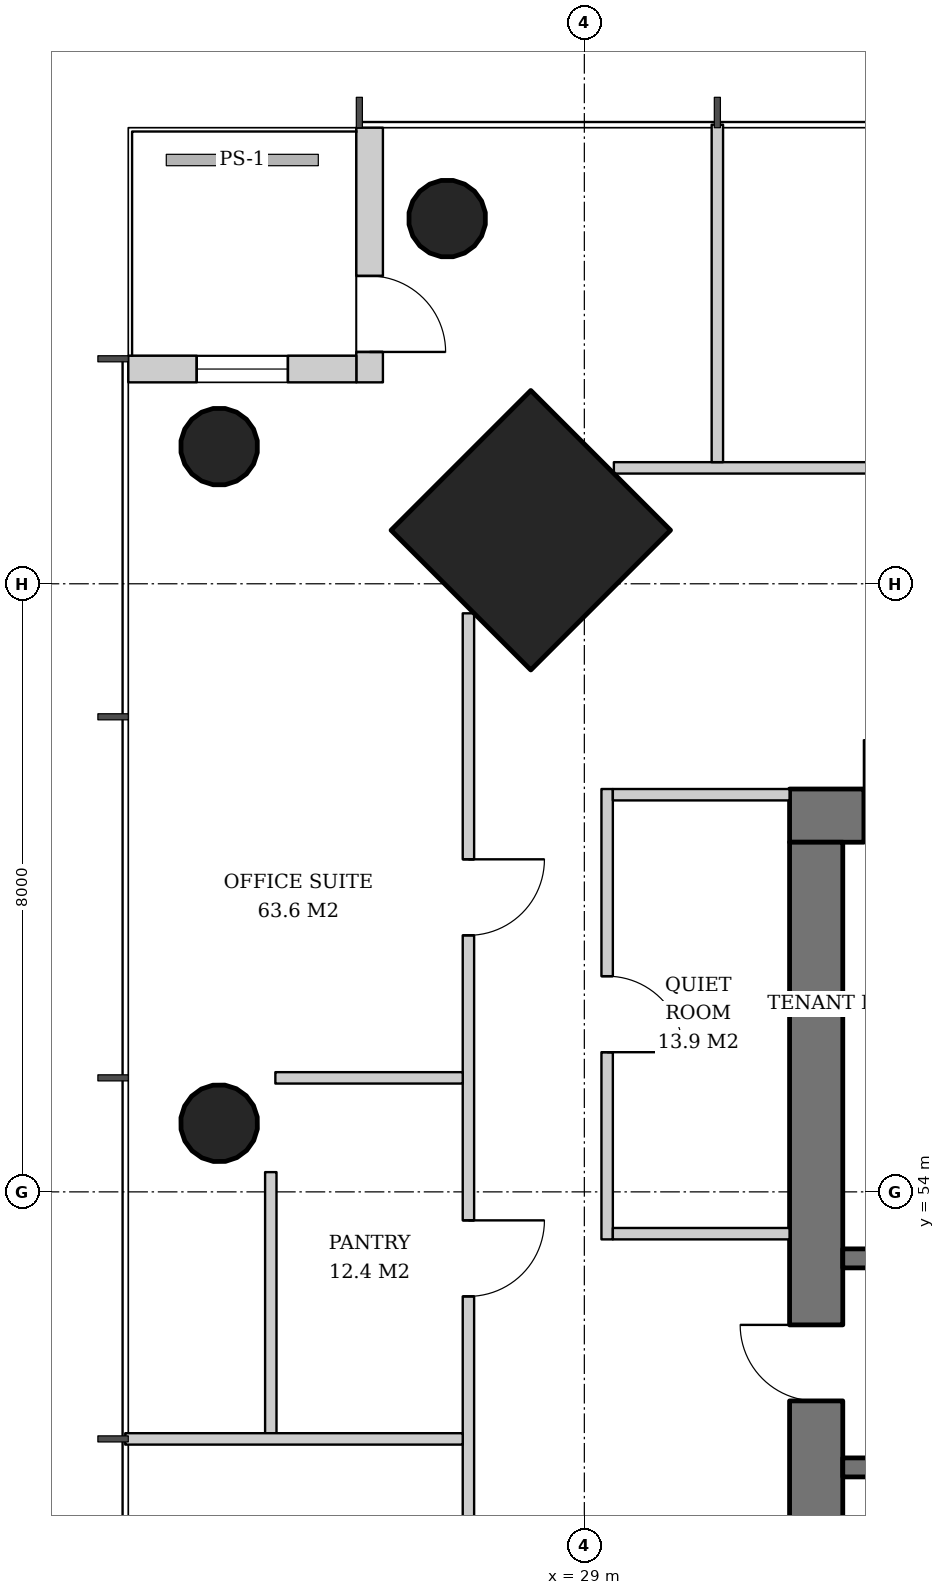
"""IFC4 building model, lengths in metres.
Left out: names, types, materials, properties, quantities, classifications, styles, units other than length and angle.
Written with IfcOpenShell. Run it as: python <this file> out.ifc"""

import sys

from ifc_helpers import new_model, si_unit, direction, frame, frame_2d, origin, origin_2d, place, context, subcontext, project, spatial, rectangle, hollow_circle, extrude, element, fill, save


model = new_model("IFC4")
c1 = context("Model", 3, precision=1e-05, world=origin(), true_north=direction((0.0, 1.0)))
c2 = subcontext(c1, "Body", "Model", "MODEL_VIEW")
j1 = project(units=[si_unit("LENGTHUNIT", "METRE"), si_unit("PLANEANGLEUNIT", "RADIAN")], contexts=[c1])
p1 = place(None, origin())
s1 = spatial("IfcSite", under=j1, at=p1, CompositionType="ELEMENT")
p2 = place(p1, origin())
s2 = spatial("IfcBuilding", under=s1, at=p2, CompositionType="ELEMENT")
p3 = place(p2, frame((0.0, 0.0, 119.8)))
s3 = spatial("IfcBuildingStorey", under=s2, at=p3, CompositionType="ELEMENT", Elevation=119.8)
p4 = place(p3, frame((28.257, 62.743, 0.0), z_axis=(0.031962158256, -0.031962158256, 0.998977898093), x_axis=(0.707106781187, 0.707106781187, 0.0)))
e1 = element("IfcColumn", 1, at=p4, inside=s3, PredefinedType="COLUMN", context=c2, shape_type="SweptSolid", body=[
    extrude(rectangle(XDim=2.6, YDim=2.6, at=origin_2d()), origin(), (0.0, 0.0, 1.0), 3.804),
])
for number, where, z_axis, x_axis in (
    (2, (27.157, 66.843, 0.0), (0.032, -0.032, 0.999), (0.707, 0.707, 0.0)),
    (3, (24.157, 63.843, 0.0), (0.032, -0.032, 0.999), (0.707, 0.707, 0.0)),
):
    element("IfcColumn", number, at=place(p3, frame(where, z_axis=z_axis, x_axis=x_axis)), inside=s3, PredefinedType="COLUMN", context=c2, shape_type="SweptSolid", body=[
        extrude(hollow_circle(Radius=0.508, WallThickness=0.04, at=origin_2d()), origin(), (0.0, 0.0, 1.0), 3.804),
    ])
p5 = place(p3, frame((24.157, 54.921, 0.0), z_axis=(0.031910269556, -0.015987237665, 0.999362868496), x_axis=(0.447933021895, 0.894067115991, 0.0)))
e4 = element("IfcColumn", 4, at=p5, inside=s3, PredefinedType="COLUMN", context=c2, shape_type="SweptSolid", body=[
    extrude(hollow_circle(Radius=0.508, WallThickness=0.04, at=origin_2d()), origin(), (0.0, 0.0, 1.0), 3.802),
])
p6 = place(p3, frame((31.7, 58.95, 0.0), z_axis=(0.0, 0.0, 1.0), x_axis=(1.0, 0.0, 0.0)))
e5 = element("IfcWall", 5, at=p6, inside=s3, PredefinedType="SHEAR", context=c2, shape_type="SweptSolid", body=[
    extrude(rectangle(XDim=26.6, YDim=0.7, at=frame_2d((13.3, 0.0))), origin(), (0.0, 0.0, 1.0), 3.8),
])
p7 = place(p6, frame((17.94, 0.0, 0.0)))
e6 = element("IfcOpeningElement", 6, at=p7, cuts=e5, PredefinedType="OPENING", context=c2, shape_type="SweptSolid", body=[
    extrude(rectangle(XDim=1.0, YDim=2.1, at=frame_2d((0.5, 1.05))), frame((0.0, 0.36, 0.0), z_axis=(0.0, -1.0, 0.0), x_axis=(1.0, 0.0, 0.0)), (0.0, 0.0, 1.0), 0.72),
])
p8 = place(p6, frame((5.825, 0.0, 0.0)))
e7 = element("IfcOpeningElement", 7, at=p8, cuts=e5, PredefinedType="OPENING", context=c2, shape_type="SweptSolid", body=[
    extrude(rectangle(XDim=1.0, YDim=2.1, at=frame_2d((0.5, 1.05))), frame((0.0, 0.36, 0.0), z_axis=(0.0, -1.0, 0.0), x_axis=(1.0, 0.0, 0.0)), (0.0, 0.0, 1.0), 0.72),
])
p9 = place(p6, frame((0.978, 0.0, 0.0)))
e8 = element("IfcOpeningElement", 8, at=p9, cuts=e5, PredefinedType="OPENING", context=c2, shape_type="SweptSolid", body=[
    extrude(rectangle(XDim=1.0, YDim=2.1, at=frame_2d((0.5, 1.05))), frame((0.0, 0.36, 0.0), z_axis=(0.0, -1.0, 0.0), x_axis=(1.0, 0.0, 0.0)), (0.0, 0.0, 1.0), 0.72),
])
p10 = place(p6, frame((2.492, 0.0, 0.0)))
e9 = element("IfcOpeningElement", 9, at=p10, cuts=e5, PredefinedType="OPENING", context=c2, shape_type="SweptSolid", body=[
    extrude(rectangle(XDim=1.0, YDim=2.1, at=frame_2d((0.5, 1.05))), frame((0.0, 0.36, 0.0), z_axis=(0.0, -1.0, 0.0), x_axis=(1.0, 0.0, 0.0)), (0.0, 0.0, 1.0), 0.72),
])
p11 = place(p6, frame((4.115, 0.0, 0.0)))
e10 = element("IfcOpeningElement", 10, at=p11, cuts=e5, PredefinedType="OPENING", context=c2, shape_type="SweptSolid", body=[
    extrude(rectangle(XDim=1.0, YDim=2.1, at=frame_2d((0.5, 1.05))), frame((0.0, 0.36, 0.0), z_axis=(0.0, -1.0, 0.0), x_axis=(1.0, 0.0, 0.0)), (0.0, 0.0, 1.0), 0.72),
])
p12 = place(p6, frame((9.126, 0.0, 0.0)))
e11 = element("IfcOpeningElement", 11, at=p12, cuts=e5, PredefinedType="OPENING", context=c2, shape_type="SweptSolid", body=[
    extrude(rectangle(XDim=1.0, YDim=2.1, at=frame_2d((0.5, 1.05))), frame((0.0, 0.36, 0.0), z_axis=(0.0, -1.0, 0.0), x_axis=(1.0, 0.0, 0.0)), (0.0, 0.0, 1.0), 0.72),
])
p13 = place(p6, frame((14.029, 0.0, 0.0)))
e12 = element("IfcOpeningElement", 12, at=p13, cuts=e5, PredefinedType="OPENING", context=c2, shape_type="SweptSolid", body=[
    extrude(rectangle(XDim=1.0, YDim=2.1, at=frame_2d((0.5, 1.05))), frame((0.0, 0.36, 0.0), z_axis=(0.0, -1.0, 0.0), x_axis=(1.0, 0.0, 0.0)), (0.0, 0.0, 1.0), 0.72),
])
p14 = place(p6, frame((22.4, 0.0, 0.0)))
e13 = element("IfcOpeningElement", 13, at=p14, cuts=e5, PredefinedType="OPENING", context=c2, shape_type="SweptSolid", body=[
    extrude(rectangle(XDim=1.0, YDim=2.1, at=frame_2d((0.5, 1.05))), frame((0.0, 0.36, 0.0), z_axis=(0.0, -1.0, 0.0), x_axis=(1.0, 0.0, 0.0)), (0.0, 0.0, 1.0), 0.72),
])
p15 = place(p3, frame((32.05, 33.4, 0.0), z_axis=(0.0, 0.0, 1.0), x_axis=(0.0, 1.0, 0.0)))
e14 = element("IfcWall", 14, at=p15, inside=s3, PredefinedType="SHEAR", context=c2, shape_type="SweptSolid", body=[
    extrude(rectangle(XDim=25.2, YDim=0.7, at=frame_2d((12.6, 0.0))), origin(), (0.0, 0.0, 1.0), 3.8),
])
p16 = place(p15, frame((11.7, 0.0, 0.0)))
e15 = element("IfcOpeningElement", 15, at=p16, cuts=e14, PredefinedType="OPENING", context=c2, shape_type="SweptSolid", body=[
    extrude(rectangle(XDim=1.8, YDim=2.4, at=frame_2d((0.9, 1.2))), frame((0.0, 0.36, 0.0), z_axis=(0.0, -1.0, 0.0), x_axis=(1.0, 0.0, 0.0)), (0.0, 0.0, 1.0), 0.72),
])
p17 = place(p15, frame((3.6, 0.0, 0.0)))
e16 = element("IfcOpeningElement", 16, at=p17, cuts=e14, PredefinedType="OPENING", context=c2, shape_type="SweptSolid", body=[
    extrude(rectangle(XDim=1.0, YDim=2.1, at=frame_2d((0.5, 1.05))), frame((0.0, 0.36, 0.0), z_axis=(0.0, -1.0, 0.0), x_axis=(1.0, 0.0, 0.0)), (0.0, 0.0, 1.0), 0.72),
])
p18 = place(p15, frame((6.35, 0.0, 0.0)))
e17 = element("IfcOpeningElement", 17, at=p18, cuts=e14, PredefinedType="OPENING", context=c2, shape_type="SweptSolid", body=[
    extrude(rectangle(XDim=1.0, YDim=2.1, at=frame_2d((0.5, 1.05))), frame((0.0, 0.36, 0.0), z_axis=(0.0, -1.0, 0.0), x_axis=(1.0, 0.0, 0.0)), (0.0, 0.0, 1.0), 0.72),
])
p19 = place(p15, frame((9.1, 0.0, 0.0)))
e18 = element("IfcOpeningElement", 18, at=p19, cuts=e14, PredefinedType="OPENING", context=c2, shape_type="SweptSolid", body=[
    extrude(rectangle(XDim=1.0, YDim=2.1, at=frame_2d((0.5, 1.05))), frame((0.0, 0.36, 0.0), z_axis=(0.0, -1.0, 0.0), x_axis=(1.0, 0.0, 0.0)), (0.0, 0.0, 1.0), 0.72),
])
p20 = place(p15, frame((15.1, 0.0, 0.0)))
e19 = element("IfcOpeningElement", 19, at=p20, cuts=e14, PredefinedType="OPENING", context=c2, shape_type="SweptSolid", body=[
    extrude(rectangle(XDim=1.0, YDim=2.1, at=frame_2d((0.5, 1.05))), frame((0.0, 0.36, 0.0), z_axis=(0.0, -1.0, 0.0), x_axis=(1.0, 0.0, 0.0)), (0.0, 0.0, 1.0), 0.72),
])
p21 = place(p15, frame((17.85, 0.0, 0.0)))
e20 = element("IfcOpeningElement", 20, at=p21, cuts=e14, PredefinedType="OPENING", context=c2, shape_type="SweptSolid", body=[
    extrude(rectangle(XDim=1.0, YDim=2.1, at=frame_2d((0.5, 1.05))), frame((0.0, 0.36, 0.0), z_axis=(0.0, -1.0, 0.0), x_axis=(1.0, 0.0, 0.0)), (0.0, 0.0, 1.0), 0.72),
])
p22 = place(p3, frame((26.175, 68.0, 0.0), z_axis=(0.0, 0.0, 1.0), x_axis=(0.0, -1.0, 0.0)))
e21 = element("IfcWall", 21, at=p22, inside=s3, PredefinedType="SOLIDWALL", context=c2, shape_type="SweptSolid", body=[
    extrude(rectangle(XDim=3.35, YDim=0.35, at=frame_2d((1.675, 0.0))), origin(), (0.0, 0.0, 1.0), 3.62),
])
p23 = place(p22, frame((1.95, 0.0, 0.0)))
e22 = element("IfcOpeningElement", 22, at=p23, cuts=e21, PredefinedType="OPENING", context=c2, shape_type="SweptSolid", body=[
    extrude(rectangle(XDim=1.0, YDim=2.4, at=frame_2d((0.5, 1.2))), frame((0.0, 0.185, 0.0), z_axis=(0.0, -1.0, 0.0), x_axis=(1.0, 0.0, 0.0)), (0.0, 0.0, 1.0), 0.37),
])
p24 = place(p3, frame((26.0, 64.825, 0.0), z_axis=(0.0, 0.0, 1.0), x_axis=(-1.0, 0.0, 0.0)))
e23 = element("IfcWall", 23, at=p24, inside=s3, PredefinedType="SOLIDWALL", context=c2, shape_type="SweptSolid", body=[
    extrude(rectangle(XDim=3.0, YDim=0.35, at=frame_2d((1.5, 0.0))), origin(), (0.0, 0.0, 1.0), 3.62),
])
p25 = place(p24, frame((0.9, 0.0, 0.6)))
e24 = element("IfcOpeningElement", 24, at=p25, cuts=e23, PredefinedType="OPENING", context=c2, shape_type="SweptSolid", body=[
    extrude(rectangle(XDim=1.2, YDim=2.55, at=frame_2d((0.6, 1.275))), frame((0.0, 0.185, 0.0), z_axis=(0.0, -1.0, 0.0), x_axis=(1.0, 0.0, 0.0)), (0.0, 0.0, 1.0), 0.37),
])
for number, where, z_axis, x_axis in (
    (25, (32.4, 50.375, 0.0), (0.0, 0.0, 1.0), (1.0, 0.0, 0.0)),
    (26, (32.4, 53.125, 0.0), (0.0, 0.0, 1.0), (1.0, 0.0, 0.0)),
):
    element("IfcWall", number, at=place(p3, frame(where, z_axis=z_axis, x_axis=x_axis)), inside=s3, PredefinedType="SHEAR", context=c2, shape_type="SweptSolid", body=[
        extrude(rectangle(XDim=2.7, YDim=0.25, at=frame_2d((1.35, 0.0))), origin(), (0.0, 0.0, 1.0), 3.8),
    ])
p26 = place(p3, frame((29.3, 59.3, 0.0), z_axis=(0.0, 0.0, 1.0), x_axis=(0.0, -1.0, 0.0)))
e27 = element("IfcWall", 27, at=p26, inside=s3, PredefinedType="PARTITIONING", context=c2, shape_type="SweptSolid", body=[
    extrude(rectangle(XDim=5.925, YDim=0.15, at=frame_2d((2.962, 0.0))), origin(), (0.0, 0.0, 1.0), 2.72),
])
p27 = place(p26, frame((2.462, 0.0, 0.0)))
e28 = element("IfcOpeningElement", 28, at=p27, cuts=e27, PredefinedType="OPENING", context=c2, shape_type="SweptSolid", body=[
    extrude(rectangle(XDim=1.0, YDim=2.1, at=frame_2d((0.5, 1.05))), frame((0.0, 0.085, 0.0), z_axis=(0.0, -1.0, 0.0), x_axis=(1.0, 0.0, 0.0)), (0.0, 0.0, 1.0), 0.17),
])
for number, where, z_axis, x_axis in (
    (29, (31.7, 59.225, 0.0), (0.0, 0.0, 1.0), (-1.0, 0.0, 0.0)),
    (30, (31.7, 53.45, 0.0), (0.0, 0.0, 1.0), (-1.0, 0.0, 0.0)),
):
    element("IfcWall", number, at=place(p3, frame(where, z_axis=z_axis, x_axis=x_axis)), inside=s3, PredefinedType="PARTITIONING", context=c2, shape_type="SweptSolid", body=[
        extrude(rectangle(XDim=2.325, YDim=0.15, at=frame_2d((1.163, 0.0))), origin(), (0.0, 0.0, 1.0), 3.62),
    ])
p28 = place(p3, frame((60.612, 63.525, 0.0), z_axis=(0.0, 0.0, 1.0), x_axis=(-1.0, 0.0, 0.0)))
e31 = element("IfcWall", 31, at=p28, inside=s3, PredefinedType="PARTITIONING", context=c2, shape_type="SweptSolid", body=[
    extrude(rectangle(XDim=31.223, YDim=0.15, at=frame_2d((15.612, 0.0))), origin(), (0.0, 0.0, 1.0), 2.72),
])
p29 = place(p28, frame((2.836, 0.0, 0.0)))
e32 = element("IfcOpeningElement", 32, at=p29, cuts=e31, PredefinedType="OPENING", context=c2, shape_type="SweptSolid", body=[
    extrude(rectangle(XDim=1.8, YDim=2.4, at=frame_2d((0.9, 1.2))), frame((0.0, 0.085, 0.0), z_axis=(0.0, -1.0, 0.0), x_axis=(1.0, 0.0, 0.0)), (0.0, 0.0, 1.0), 0.17),
])
p30 = place(p28, frame((7.586, 0.0, 0.0)))
e33 = element("IfcOpeningElement", 33, at=p30, cuts=e31, PredefinedType="OPENING", context=c2, shape_type="SweptSolid", body=[
    extrude(rectangle(XDim=1.8, YDim=2.4, at=frame_2d((0.9, 1.2))), frame((0.0, 0.085, 0.0), z_axis=(0.0, -1.0, 0.0), x_axis=(1.0, 0.0, 0.0)), (0.0, 0.0, 1.0), 0.17),
])
p31 = place(p3, frame((30.75, 63.6, 0.0), z_axis=(0.0, 0.0, 1.0), x_axis=(0.0, 1.0, 0.0)))
e34 = element("IfcWall", 34, at=p31, inside=s3, PredefinedType="PARTITIONING", context=c2, shape_type="SweptSolid", body=[
    extrude(rectangle(XDim=4.44, YDim=0.15, at=frame_2d((2.22, 0.0))), origin(), (0.0, 0.0, 1.0), 2.82),
])
p32 = place(p3, frame((24.875, 54.26, 0.0), z_axis=(0.0, 0.0, 1.0), x_axis=(0.0, -1.0, 0.0)))
e35 = element("IfcWall", 35, at=p32, inside=s3, PredefinedType="PARTITIONING", context=c2, shape_type="SweptSolid", body=[
    extrude(rectangle(XDim=3.435, YDim=0.15, at=frame_2d((1.717, 0.0))), origin(), (0.0, 0.0, 1.0), 3.62),
])
p33 = place(p3, frame((27.475, 61.612, 0.0), z_axis=(0.0, 0.0, 1.0), x_axis=(0.0, -1.0, 0.0)))
e36 = element("IfcWall", 36, at=p33, inside=s3, PredefinedType="PARTITIONING", context=c2, shape_type="SweptSolid", body=[
    extrude(rectangle(XDim=31.223, YDim=0.15, at=frame_2d((15.612, 0.0))), origin(), (0.0, 0.0, 1.0), 2.72),
])
p34 = place(p33, frame((3.237, 0.0, 0.0)))
e37 = element("IfcOpeningElement", 37, at=p34, cuts=e36, PredefinedType="OPENING", context=c2, shape_type="SweptSolid", body=[
    extrude(rectangle(XDim=1.0, YDim=2.1, at=frame_2d((0.5, 1.05))), frame((0.0, 0.085, 0.0), z_axis=(0.0, -1.0, 0.0), x_axis=(1.0, 0.0, 0.0)), (0.0, 0.0, 1.0), 0.17),
])
p35 = place(p33, frame((7.987, 0.0, 0.0)))
e38 = element("IfcOpeningElement", 38, at=p35, cuts=e36, PredefinedType="OPENING", context=c2, shape_type="SweptSolid", body=[
    extrude(rectangle(XDim=1.0, YDim=2.1, at=frame_2d((0.5, 1.05))), frame((0.0, 0.085, 0.0), z_axis=(0.0, -1.0, 0.0), x_axis=(1.0, 0.0, 0.0)), (0.0, 0.0, 1.0), 0.17),
])
p36 = place(p33, frame((12.737, 0.0, 0.0)))
e39 = element("IfcOpeningElement", 39, at=p36, cuts=e36, PredefinedType="OPENING", context=c2, shape_type="SweptSolid", body=[
    extrude(rectangle(XDim=1.0, YDim=2.1, at=frame_2d((0.5, 1.05))), frame((0.0, 0.085, 0.0), z_axis=(0.0, -1.0, 0.0), x_axis=(1.0, 0.0, 0.0)), (0.0, 0.0, 1.0), 0.17),
])
p37 = place(p33, frame((17.586, 0.0, 0.0)))
e40 = element("IfcOpeningElement", 40, at=p37, cuts=e36, PredefinedType="OPENING", context=c2, shape_type="SweptSolid", body=[
    extrude(rectangle(XDim=0.8, YDim=2.1, at=frame_2d((0.4, 1.05))), frame((0.0, 0.085, 0.0), z_axis=(0.0, -1.0, 0.0), x_axis=(1.0, 0.0, 0.0)), (0.0, 0.0, 1.0), 0.17),
])
p38 = place(p33, frame((22.237, 0.0, 0.0)))
e41 = element("IfcOpeningElement", 41, at=p38, cuts=e36, PredefinedType="OPENING", context=c2, shape_type="SweptSolid", body=[
    extrude(rectangle(XDim=1.0, YDim=2.1, at=frame_2d((0.5, 1.05))), frame((0.0, 0.085, 0.0), z_axis=(0.0, -1.0, 0.0), x_axis=(1.0, 0.0, 0.0)), (0.0, 0.0, 1.0), 0.17),
])
p39 = place(p33, frame((27.086, 0.0, 0.0)))
e42 = element("IfcOpeningElement", 42, at=p39, cuts=e36, PredefinedType="OPENING", context=c2, shape_type="SweptSolid", body=[
    extrude(rectangle(XDim=0.8, YDim=2.1, at=frame_2d((0.4, 1.05))), frame((0.0, 0.085, 0.0), z_axis=(0.0, -1.0, 0.0), x_axis=(1.0, 0.0, 0.0)), (0.0, 0.0, 1.0), 0.17),
])
p40 = place(p3, frame((27.4, 55.5, 0.0), z_axis=(0.0, 0.0, 1.0), x_axis=(-1.0, 0.0, 0.0)))
e43 = element("IfcWall", 43, at=p40, inside=s3, PredefinedType="PARTITIONING", context=c2, shape_type="SweptSolid", body=[
    extrude(rectangle(XDim=2.465, YDim=0.15, at=frame_2d((1.232, 0.0))), origin(), (0.0, 0.0, 1.0), 3.62),
])
p41 = place(p3, frame((27.4, 50.75, 0.0), z_axis=(0.0, 0.0, 1.0), x_axis=(-1.0, 0.0, 0.0)))
e44 = element("IfcWall", 44, at=p41, inside=s3, PredefinedType="PARTITIONING", context=c2, shape_type="SweptSolid", body=[
    extrude(rectangle(XDim=4.44, YDim=0.15, at=frame_2d((2.22, 0.0))), origin(), (0.0, 0.0, 1.0), 2.82),
])
p42 = place(p23, origin())
e45 = element("IfcDoor", 45, at=p42, inside=s3, OperationType="SINGLE_SWING_RIGHT", PredefinedType="DOOR", context=c2, shape_type="SweptSolid", body=[
    extrude(rectangle(XDim=1.0, YDim=2.4, at=frame_2d((0.5, 1.2))), frame((0.0, 0.025, 0.0), z_axis=(0.0, -1.0, 0.0), x_axis=(1.0, 0.0, 0.0)), (0.0, 0.0, 1.0), 0.05),
])
fill(e22, e45)
p43 = place(p25, origin())
e46 = element("IfcWindow", 46, at=p43, inside=s3, PartitioningType="SINGLE_PANEL", PredefinedType="WINDOW", context=c2, shape_type="SweptSolid", body=[
    extrude(rectangle(XDim=1.2, YDim=2.55, at=frame_2d((0.6, 1.275))), frame((0.0, 0.03, 0.0), z_axis=(0.0, -1.0, 0.0), x_axis=(1.0, 0.0, 0.0)), (0.0, 0.0, 1.0), 0.06),
])
fill(e24, e46)
p44 = place(p21, origin())
e47 = element("IfcDoor", 47, at=p44, inside=s3, OperationType="SINGLE_SWING_RIGHT", PredefinedType="DOOR", context=c2, shape_type="SweptSolid", body=[
    extrude(rectangle(XDim=1.0, YDim=2.1, at=frame_2d((0.5, 1.05))), frame((0.0, -0.29, 0.0), z_axis=(0.0, -1.0, 0.0), x_axis=(1.0, 0.0, 0.0)), (0.0, 0.0, 1.0), 0.05),
])
fill(e20, e47)
p45 = place(p9, origin())
e48 = element("IfcDoor", 48, at=p45, inside=s3, OperationType="SINGLE_SWING_LEFT", PredefinedType="DOOR", context=c2, shape_type="SweptSolid", body=[
    extrude(rectangle(XDim=1.0, YDim=2.1, at=frame_2d((0.5, 1.05))), frame((0.0, -0.29, 0.0), z_axis=(0.0, -1.0, 0.0), x_axis=(1.0, 0.0, 0.0)), (0.0, 0.0, 1.0), 0.05),
])
fill(e8, e48)
p46 = place(p27, origin())
e49 = element("IfcDoor", 49, at=p46, inside=s3, OperationType="SINGLE_SWING_RIGHT", PredefinedType="DOOR", context=c2, shape_type="SweptSolid", body=[
    extrude(rectangle(XDim=1.0, YDim=2.1, at=frame_2d((0.5, 1.05))), frame((0.0, 0.025, 0.0), z_axis=(0.0, -1.0, 0.0), x_axis=(1.0, 0.0, 0.0)), (0.0, 0.0, 1.0), 0.05),
])
fill(e28, e49)
p47 = place(p34, origin())
e50 = element("IfcDoor", 50, at=p47, inside=s3, OperationType="SINGLE_SWING_LEFT", PredefinedType="DOOR", context=c2, shape_type="SweptSolid", body=[
    extrude(rectangle(XDim=1.0, YDim=2.1, at=frame_2d((0.5, 1.05))), frame((0.0, 0.025, 0.0), z_axis=(0.0, -1.0, 0.0), x_axis=(1.0, 0.0, 0.0)), (0.0, 0.0, 1.0), 0.05),
])
fill(e37, e50)
p48 = place(p35, origin())
e51 = element("IfcDoor", 51, at=p48, inside=s3, OperationType="SINGLE_SWING_LEFT", PredefinedType="DOOR", context=c2, shape_type="SweptSolid", body=[
    extrude(rectangle(XDim=1.0, YDim=2.1, at=frame_2d((0.5, 1.05))), frame((0.0, 0.025, 0.0), z_axis=(0.0, -1.0, 0.0), x_axis=(1.0, 0.0, 0.0)), (0.0, 0.0, 1.0), 0.05),
])
fill(e38, e51)
save(model, sys.argv[1])
